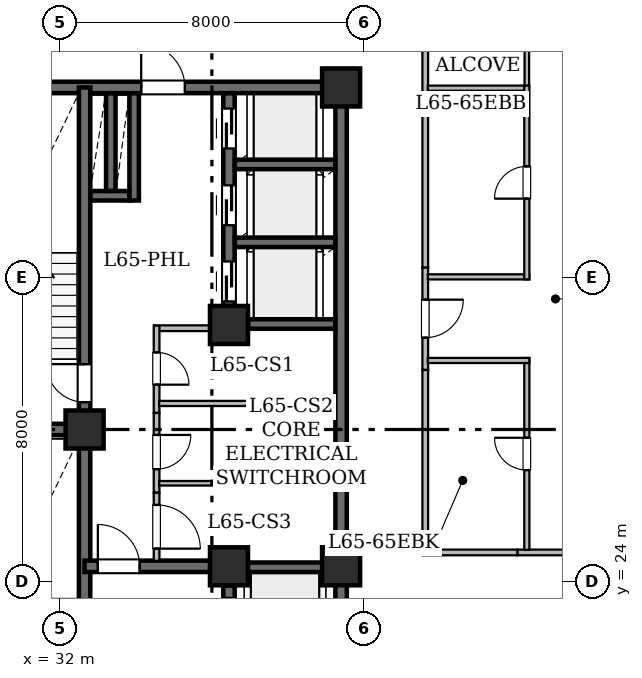
"""IFC4 building model, lengths in metres.
Left out: names, types, materials, properties, quantities, classifications, styles, units other than length and angle.
Written with IfcOpenShell. Run it as: python <this file> out.ifc"""

import sys

from ifc_helpers import new_model, si_unit, direction, frame, frame_2d, origin, origin_2d, place, context, subcontext, project, spatial, rectangle, hollow_rectangle, extrude, element, fill, save


model = new_model("IFC4")
c1 = context("Model", 3, precision=1e-05, world=origin(), true_north=direction((0.0, 1.0)))
c2 = subcontext(c1, "Body", "Model", "MODEL_VIEW")
j1 = project(units=[si_unit("LENGTHUNIT", "METRE"), si_unit("PLANEANGLEUNIT", "RADIAN")], contexts=[c1])
p1 = place(None, origin())
s1 = spatial("IfcSite", under=j1, at=p1, CompositionType="ELEMENT")
p2 = place(p1, origin())
s2 = spatial("IfcBuilding", under=s1, at=p2, CompositionType="ELEMENT")
p3 = place(p2, frame((0.0, 0.0, 253.7)))
s3 = spatial("IfcBuildingStorey", under=s2, at=p3, CompositionType="ELEMENT", Elevation=253.7)
for number, where, z_axis, x_axis in (
    (1, (32.65, 28.0, 0.0), (0.0, 0.0, 1.0), (1.0, 0.0, 0.0)),
    (2, (36.45, 24.4, 0.0), (0.0, 0.0, 1.0), (1.0, 0.0, 0.0)),
    (3, (39.4, 24.4, 0.0), (0.0, 0.0, 1.0), (1.0, 0.0, 0.0)),
    (4, (36.45, 30.75, 0.0), (0.0, 0.0, 1.0), (1.0, 0.0, 0.0)),
    (5, (39.4, 37.0, 0.0), (0.0, 0.0, 1.0), (1.0, 0.0, 0.0)),
):
    element("IfcColumn", number, at=place(p3, frame(where, z_axis=z_axis, x_axis=x_axis)), inside=s3, PredefinedType="COLUMN", context=c2, shape_type="SweptSolid", body=[
        extrude(hollow_rectangle(XDim=1.0, YDim=1.0, WallThickness=0.05, at=origin_2d()), origin(), (0.0, 0.0, 1.0), 3.65),
    ])
p4 = place(p3, frame((29.0, 37.0, 0.0), z_axis=(0.0, 0.0, 1.0), x_axis=(1.0, 0.0, 0.0)))
e6 = element("IfcWall", 6, at=p4, inside=s3, PredefinedType="SHEAR", context=c2, shape_type="SweptSolid", body=[
    extrude(rectangle(XDim=10.4, YDim=0.3, at=frame_2d((5.2, 0.0))), origin(), (0.0, 0.0, 1.0), 3.43),
])
p5 = place(p4, frame((5.14, 0.0, 0.0)))
e7 = element("IfcOpeningElement", 7, at=p5, cuts=e6, PredefinedType="OPENING", context=c2, shape_type="SweptSolid", body=[
    extrude(rectangle(XDim=1.15, YDim=2.2, at=frame_2d((0.575, 1.1))), frame((0.0, 0.16, 0.0), z_axis=(0.0, -1.0, 0.0), x_axis=(1.0, 0.0, 0.0)), (0.0, 0.0, 1.0), 0.32),
])
p6 = place(p3, frame((39.4, 19.0, 0.0), z_axis=(0.0, 0.0, 1.0), x_axis=(0.0, 1.0, 0.0)))
e8 = element("IfcWall", 8, at=p6, inside=s3, PredefinedType="SHEAR", context=c2, shape_type="SweptSolid", body=[
    extrude(rectangle(XDim=5.4, YDim=0.3, at=frame_2d((2.7, 0.0))), origin(), (0.0, 0.0, 1.0), 3.43),
])
p7 = place(p3, frame((39.4, 24.4, 0.0), z_axis=(0.0, 0.0, 1.0), x_axis=(0.0, 1.0, 0.0)))
e9 = element("IfcWall", 9, at=p7, inside=s3, PredefinedType="SHEAR", context=c2, shape_type="SweptSolid", body=[
    extrude(rectangle(XDim=12.6, YDim=0.3, at=frame_2d((6.3, 0.0))), origin(), (0.0, 0.0, 1.0), 3.43),
])
p8 = place(p3, frame((32.65, 19.0, 0.0), z_axis=(0.0, 0.0, 1.0), x_axis=(0.0, 1.0, 0.0)))
e10 = element("IfcWall", 10, at=p8, inside=s3, PredefinedType="SHEAR", context=c2, shape_type="SweptSolid", body=[
    extrude(rectangle(XDim=9.0, YDim=0.3, at=frame_2d((4.5, 0.0))), origin(), (0.0, 0.0, 1.0), 3.43),
])
p9 = place(p8, frame((0.72, 0.0, 0.0)))
e11 = element("IfcOpeningElement", 11, at=p9, cuts=e10, PredefinedType="OPENING", context=c2, shape_type="SweptSolid", body=[
    extrude(rectangle(XDim=1.0, YDim=2.15, at=frame_2d((0.5, 1.075))), frame((0.0, 0.16, 0.0), z_axis=(0.0, -1.0, 0.0), x_axis=(1.0, 0.0, 0.0)), (0.0, 0.0, 1.0), 0.32),
])
p10 = place(p3, frame((32.65, 28.0, 0.0), z_axis=(0.0, 0.0, 1.0), x_axis=(0.0, 1.0, 0.0)))
e12 = element("IfcWall", 12, at=p10, inside=s3, PredefinedType="SHEAR", context=c2, shape_type="SweptSolid", body=[
    extrude(rectangle(XDim=9.0, YDim=0.3, at=frame_2d((4.5, 0.0))), origin(), (0.0, 0.0, 1.0), 3.43),
])
p11 = place(p10, frame((0.72, 0.0, 0.0)))
e13 = element("IfcOpeningElement", 13, at=p11, cuts=e12, PredefinedType="OPENING", context=c2, shape_type="SweptSolid", body=[
    extrude(rectangle(XDim=1.0, YDim=2.15, at=frame_2d((0.5, 1.075))), frame((0.0, 0.16, 0.0), z_axis=(0.0, -1.0, 0.0), x_axis=(1.0, 0.0, 0.0)), (0.0, 0.0, 1.0), 0.32),
])
p12 = place(p3, frame((29.0, 28.0, 0.0), z_axis=(0.0, 0.0, 1.0), x_axis=(1.0, 0.0, 0.0)))
e14 = element("IfcWall", 14, at=p12, inside=s3, PredefinedType="SHEAR", context=c2, shape_type="SweptSolid", body=[
    extrude(rectangle(XDim=3.65, YDim=0.3, at=frame_2d((1.825, 0.0))), origin(), (0.0, 0.0, 1.0), 3.43),
])
p13 = place(p3, frame((32.65, 24.4, 0.0), z_axis=(0.0, 0.0, 1.0), x_axis=(1.0, 0.0, 0.0)))
e15 = element("IfcWall", 15, at=p13, inside=s3, PredefinedType="SHEAR", context=c2, shape_type="SweptSolid", body=[
    extrude(rectangle(XDim=3.8, YDim=0.3, at=frame_2d((1.9, 0.0))), origin(), (0.0, 0.0, 1.0), 3.43),
])
p14 = place(p13, frame((0.35, 0.0, 0.0)))
e16 = element("IfcOpeningElement", 16, at=p14, cuts=e15, PredefinedType="OPENING", context=c2, shape_type="SweptSolid", body=[
    extrude(rectangle(XDim=1.1, YDim=2.15, at=frame_2d((0.55, 1.075))), frame((0.0, 0.16, 0.0), z_axis=(0.0, -1.0, 0.0), x_axis=(1.0, 0.0, 0.0)), (0.0, 0.0, 1.0), 0.32),
])
p15 = place(p3, frame((36.45, 19.154, 0.0), z_axis=(0.0, 0.0, 1.0), x_axis=(0.0, 1.0, 0.0)))
e17 = element("IfcWall", 17, at=p15, inside=s3, PredefinedType="SHEAR", context=c2, shape_type="SweptSolid", body=[
    extrude(rectangle(XDim=4.746, YDim=0.3, at=frame_2d((2.373, 0.0))), origin(), (0.0, 0.0, 1.0), 3.43),
])
p16 = place(p15, frame((0.696, 0.0, 0.0)))
e18 = element("IfcOpeningElement", 18, at=p16, cuts=e17, PredefinedType="OPENING", context=c2, shape_type="SweptSolid", body=[
    extrude(rectangle(XDim=1.1, YDim=2.15, at=frame_2d((0.55, 1.075))), frame((0.0, 0.16, 0.0), z_axis=(0.0, -1.0, 0.0), x_axis=(1.0, 0.0, 0.0)), (0.0, 0.0, 1.0), 0.32),
])
p17 = place(p15, frame((3.316, 0.0, 0.0)))
e19 = element("IfcOpeningElement", 19, at=p17, cuts=e17, PredefinedType="OPENING", context=c2, shape_type="SweptSolid", body=[
    extrude(rectangle(XDim=1.1, YDim=2.15, at=frame_2d((0.55, 1.075))), frame((0.0, 0.16, 0.0), z_axis=(0.0, -1.0, 0.0), x_axis=(1.0, 0.0, 0.0)), (0.0, 0.0, 1.0), 0.32),
])
p18 = place(p3, frame((36.45, 31.25, 0.0), z_axis=(0.0, 0.0, 1.0), x_axis=(0.0, 1.0, 0.0)))
e20 = element("IfcWall", 20, at=p18, inside=s3, PredefinedType="SHEAR", context=c2, shape_type="SweptSolid", body=[
    extrude(rectangle(XDim=5.596, YDim=0.3, at=frame_2d((2.798, 0.0))), origin(), (0.0, 0.0, 1.0), 3.43),
])
p19 = place(p18, frame((0.12, 0.0, 0.0)))
e21 = element("IfcOpeningElement", 21, at=p19, cuts=e20, PredefinedType="OPENING", context=c2, shape_type="SweptSolid", body=[
    extrude(rectangle(XDim=1.05, YDim=2.15, at=frame_2d((0.525, 1.075))), frame((0.0, 0.16, 0.0), z_axis=(0.0, -1.0, 0.0), x_axis=(1.0, 0.0, 0.0)), (0.0, 0.0, 1.0), 0.32),
])
p20 = place(p18, frame((2.125, 0.0, 0.0)))
e22 = element("IfcOpeningElement", 22, at=p20, cuts=e20, PredefinedType="OPENING", context=c2, shape_type="SweptSolid", body=[
    extrude(rectangle(XDim=1.05, YDim=2.15, at=frame_2d((0.525, 1.075))), frame((0.0, 0.16, 0.0), z_axis=(0.0, -1.0, 0.0), x_axis=(1.0, 0.0, 0.0)), (0.0, 0.0, 1.0), 0.32),
])
p21 = place(p18, frame((4.145, 0.0, 0.0)))
e23 = element("IfcOpeningElement", 23, at=p21, cuts=e20, PredefinedType="OPENING", context=c2, shape_type="SweptSolid", body=[
    extrude(rectangle(XDim=1.05, YDim=2.15, at=frame_2d((0.525, 1.075))), frame((0.0, 0.16, 0.0), z_axis=(0.0, -1.0, 0.0), x_axis=(1.0, 0.0, 0.0)), (0.0, 0.0, 1.0), 0.32),
])
p22 = place(p3, frame((36.604, 24.375, 0.0), z_axis=(0.0, 0.0, 1.0), x_axis=(1.0, 0.0, 0.0)))
e24 = element("IfcWall", 24, at=p22, inside=s3, PredefinedType="SHEAR", context=c2, shape_type="SweptSolid", body=[
    extrude(rectangle(XDim=2.642, YDim=0.25, at=frame_2d((1.321, 0.0))), origin(), (0.0, 0.0, 1.0), 3.43),
])
p23 = place(p3, frame((36.954, 30.775, 0.0), z_axis=(0.0, 0.0, 1.0), x_axis=(1.0, 0.0, 0.0)))
e25 = element("IfcWall", 25, at=p23, inside=s3, PredefinedType="SHEAR", context=c2, shape_type="SweptSolid", body=[
    extrude(rectangle(XDim=2.292, YDim=0.25, at=frame_2d((1.146, 0.0))), origin(), (0.0, 0.0, 1.0), 3.43),
])
for number, where, z_axis, x_axis in (
    (26, (36.604, 32.925, 0.0), (0.0, 0.0, 1.0), (1.0, 0.0, 0.0)),
    (27, (36.604, 34.975, 0.0), (0.0, 0.0, 1.0), (1.0, 0.0, 0.0)),
):
    element("IfcWall", number, at=place(p3, frame(where, z_axis=z_axis, x_axis=x_axis)), inside=s3, PredefinedType="SHEAR", context=c2, shape_type="SweptSolid", body=[
        extrude(rectangle(XDim=2.642, YDim=0.25, at=frame_2d((1.321, 0.0))), origin(), (0.0, 0.0, 1.0), 3.43),
    ])
p24 = place(p3, frame((33.955, 34.025, 0.0), z_axis=(0.0, 0.0, 1.0), x_axis=(0.0, 1.0, 0.0)))
e28 = element("IfcWall", 28, at=p24, inside=s3, PredefinedType="SHEAR", context=c2, shape_type="SweptSolid", body=[
    extrude(rectangle(XDim=2.821, YDim=0.25, at=frame_2d((1.411, 0.0))), origin(), (0.0, 0.0, 1.0), 3.43),
])
p25 = place(p3, frame((32.804, 34.15, 0.0), z_axis=(0.0, 0.0, 1.0), x_axis=(1.0, 0.0, 0.0)))
e29 = element("IfcWall", 29, at=p25, inside=s3, PredefinedType="SHEAR", context=c2, shape_type="SweptSolid", body=[
    extrude(rectangle(XDim=1.022, YDim=0.25, at=frame_2d((0.511, 0.0))), origin(), (0.0, 0.0, 1.0), 3.43),
])
p26 = place(p3, frame((33.34, 34.279, 0.0), z_axis=(0.0, 0.0, 1.0), x_axis=(0.0, 1.0, 0.0)))
e30 = element("IfcWall", 30, at=p26, inside=s3, PredefinedType="SHEAR", context=c2, shape_type="SweptSolid", body=[
    extrude(rectangle(XDim=2.567, YDim=0.25, at=frame_2d((1.283, 0.0))), origin(), (0.0, 0.0, 1.0), 3.43),
])
p27 = place(p3, frame((36.3, 30.665, 0.0), z_axis=(0.0, 0.0, 1.0), x_axis=(-1.0, 0.0, 0.0)))
e31 = element("IfcWall", 31, at=p27, inside=s3, PredefinedType="STANDARD", context=c2, shape_type="SweptSolid", body=[
    extrude(rectangle(XDim=1.82, YDim=0.15, at=frame_2d((0.91, 0.0))), origin(), (0.0, 0.0, 1.0), 3.43),
])
p28 = place(p3, frame((34.545, 30.73, 0.0), z_axis=(0.0, 0.0, 1.0), x_axis=(0.0, -1.0, 0.0)))
e32 = element("IfcWall", 32, at=p28, inside=s3, PredefinedType="STANDARD", context=c2, shape_type="SweptSolid", body=[
    extrude(rectangle(XDim=2.294, YDim=0.15, at=frame_2d((1.147, 0.0))), origin(), (0.0, 0.0, 1.0), 3.43),
])
p29 = place(p28, frame((0.701, 0.0, 0.0)))
e33 = element("IfcOpeningElement", 33, at=p29, cuts=e32, PredefinedType="OPENING", context=c2, shape_type="SweptSolid", body=[
    extrude(rectangle(XDim=0.85, YDim=2.1, at=frame_2d((0.425, 1.05))), frame((0.0, 0.085, 0.0), z_axis=(0.0, -1.0, 0.0), x_axis=(1.0, 0.0, 0.0)), (0.0, 0.0, 1.0), 0.17),
])
p30 = place(p3, frame((34.545, 28.436, 0.0), z_axis=(0.0, 0.0, 1.0), x_axis=(0.0, -1.0, 0.0)))
e34 = element("IfcWall", 34, at=p30, inside=s3, PredefinedType="STANDARD", context=c2, shape_type="SweptSolid", body=[
    extrude(rectangle(XDim=2.1, YDim=0.15, at=frame_2d((1.05, 0.0))), origin(), (0.0, 0.0, 1.0), 3.43),
])
p31 = place(p30, frame((0.579, 0.0, 0.0)))
e35 = element("IfcOpeningElement", 35, at=p31, cuts=e34, PredefinedType="OPENING", context=c2, shape_type="SweptSolid", body=[
    extrude(rectangle(XDim=0.9, YDim=2.1, at=frame_2d((0.45, 1.05))), frame((0.0, 0.085, 0.0), z_axis=(0.0, -1.0, 0.0), x_axis=(1.0, 0.0, 0.0)), (0.0, 0.0, 1.0), 0.17),
])
p32 = place(p3, frame((34.545, 26.336, 0.0), z_axis=(0.0, 0.0, 1.0), x_axis=(0.0, -1.0, 0.0)))
e36 = element("IfcWall", 36, at=p32, inside=s3, PredefinedType="STANDARD", context=c2, shape_type="SweptSolid", body=[
    extrude(rectangle(XDim=1.792, YDim=0.15, at=frame_2d((0.896, 0.0))), origin(), (0.0, 0.0, 1.0), 3.43),
])
p33 = place(p32, frame((0.321, 0.0, 0.0)))
e37 = element("IfcOpeningElement", 37, at=p33, cuts=e36, PredefinedType="OPENING", context=c2, shape_type="SweptSolid", body=[
    extrude(rectangle(XDim=1.15, YDim=2.2, at=frame_2d((0.575, 1.1))), frame((0.0, 0.085, 0.0), z_axis=(0.0, -1.0, 0.0), x_axis=(1.0, 0.0, 0.0)), (0.0, 0.0, 1.0), 0.17),
])
p34 = place(p3, frame((39.256, 28.685, 0.0), z_axis=(0.0, 0.0, 1.0), x_axis=(-1.0, 0.0, 0.0)))
e38 = element("IfcWall", 38, at=p34, inside=s3, PredefinedType="PARTITIONING", context=c2, shape_type="SweptSolid", body=[
    extrude(rectangle(XDim=4.644, YDim=0.135, at=frame_2d((2.322, 0.0))), origin(), (0.0, 0.0, 1.0), 3.43),
])
p35 = place(p3, frame((39.256, 26.585, 0.0), z_axis=(0.0, 0.0, 1.0), x_axis=(-1.0, 0.0, 0.0)))
e39 = element("IfcWall", 39, at=p35, inside=s3, PredefinedType="PARTITIONING", context=c2, shape_type="SweptSolid", body=[
    extrude(rectangle(XDim=4.644, YDim=0.12, at=frame_2d((2.322, 0.0))), origin(), (0.0, 0.0, 1.0), 3.43),
])
p36 = place(p3, frame((41.615, 39.1, 0.0), z_axis=(0.0, 0.0, 1.0), x_axis=(0.0, -1.0, 0.0)))
e40 = element("IfcWall", 40, at=p36, inside=s3, PredefinedType="STANDARD", context=c2, shape_type="SweptSolid", body=[
    extrude(rectangle(XDim=2.368, YDim=0.15, at=frame_2d((1.184, 0.0))), origin(), (0.0, 0.0, 1.0), 2.725),
])
p37 = place(p3, frame((41.615, 32.265, 0.0), z_axis=(0.0, 0.0, 1.0), x_axis=(0.0, -1.0, 0.0)))
e41 = element("IfcWall", 41, at=p37, inside=s3, PredefinedType="STANDARD", context=c2, shape_type="SweptSolid", body=[
    extrude(rectangle(XDim=2.698, YDim=0.15, at=frame_2d((1.349, 0.0))), origin(), (0.0, 0.0, 1.0), 3.43),
])
p38 = place(p37, frame((0.849, 0.0, 0.0)))
e42 = element("IfcOpeningElement", 42, at=p38, cuts=e41, PredefinedType="OPENING", context=c2, shape_type="SweptSolid", body=[
    extrude(rectangle(XDim=1.0, YDim=2.15, at=frame_2d((0.5, 1.075))), frame((0.0, 0.085, 0.0), z_axis=(0.0, -1.0, 0.0), x_axis=(1.0, 0.0, 0.0)), (0.0, 0.0, 1.0), 0.17),
])
p39 = place(p3, frame((44.039, 24.765, 0.0), z_axis=(0.0, 0.0, 1.0), x_axis=(1.0, 0.0, 0.0)))
e43 = element("IfcWall", 43, at=p39, inside=s3, PredefinedType="STANDARD", context=c2, shape_type="SweptSolid", body=[
    extrude(rectangle(XDim=2.078, YDim=0.15, at=frame_2d((1.039, 0.0))), origin(), (0.0, 0.0, 1.0), 3.43),
])
p40 = place(p3, frame((41.615, 36.732, 0.0), z_axis=(0.0, 0.0, 1.0), x_axis=(0.0, -1.0, 0.0)))
e44 = element("IfcWall", 44, at=p40, inside=s3, PredefinedType="STANDARD", context=c2, shape_type="SweptSolid", body=[
    extrude(rectangle(XDim=4.467, YDim=0.15, at=frame_2d((2.233, 0.0))), origin(), (0.0, 0.0, 1.0), 3.013),
])
p41 = place(p3, frame((41.615, 29.567, 0.0), z_axis=(0.0, 0.0, 1.0), x_axis=(0.0, -1.0, 0.0)))
e45 = element("IfcWall", 45, at=p41, inside=s3, PredefinedType="STANDARD", context=c2, shape_type="SweptSolid", body=[
    extrude(rectangle(XDim=4.867, YDim=0.15, at=frame_2d((2.434, 0.0))), origin(), (0.0, 0.0, 1.0), 3.43),
])
p42 = place(p3, frame((41.55, 24.765, 0.0), z_axis=(0.0, 0.0, 1.0), x_axis=(1.0, 0.0, 0.0)))
e46 = element("IfcWall", 46, at=p42, inside=s3, PredefinedType="STANDARD", context=c2, shape_type="SweptSolid", body=[
    extrude(rectangle(XDim=2.489, YDim=0.15, at=frame_2d((1.245, 0.0))), origin(), (0.0, 0.0, 1.0), 3.43),
])
p43 = place(p3, frame((44.288, 43.808, 0.0), z_axis=(0.0, 0.0, 1.0), x_axis=(0.0, -1.0, 0.0)))
e47 = element("IfcWall", 47, at=p43, inside=s3, PredefinedType="PARTITIONING", context=c2, shape_type="SweptSolid", body=[
    extrude(rectangle(XDim=6.762, YDim=0.12, at=frame_2d((3.381, 0.0))), origin(), (0.0, 0.0, 1.0), 2.725),
])
p44 = place(p43, frame((2.931, 0.0, 0.0)))
e48 = element("IfcOpeningElement", 48, at=p44, cuts=e47, PredefinedType="OPENING", context=c2, shape_type="SweptSolid", body=[
    extrude(rectangle(XDim=0.9, YDim=2.1, at=frame_2d((0.45, 1.05))), frame((0.0, 0.07, 0.0), z_axis=(0.0, -1.0, 0.0), x_axis=(1.0, 0.0, 0.0)), (0.0, 0.0, 1.0), 0.14),
])
p45 = place(p3, frame((44.223, 36.981, 0.0), z_axis=(0.0, 0.0, 1.0), x_axis=(-1.0, 0.0, 0.0)))
e49 = element("IfcWall", 49, at=p45, inside=s3, PredefinedType="PARTITIONING", context=c2, shape_type="SweptSolid", body=[
    extrude(rectangle(XDim=2.541, YDim=0.135, at=frame_2d((1.271, 0.0))), origin(), (0.0, 0.0, 1.0), 2.725),
])
p46 = place(p3, frame((41.682, 32.016, 0.0), z_axis=(0.0, 0.0, 1.0), x_axis=(1.0, 0.0, 0.0)))
e50 = element("IfcWall", 50, at=p46, inside=s3, PredefinedType="PARTITIONING", context=c2, shape_type="SweptSolid", body=[
    extrude(rectangle(XDim=2.671, YDim=0.135, at=frame_2d((1.335, 0.0))), origin(), (0.0, 0.0, 1.0), 3.43),
])
p47 = place(p3, frame((44.288, 31.951, 0.0), z_axis=(0.0, 0.0, 1.0), x_axis=(0.0, 1.0, 0.0)))
e51 = element("IfcWall", 51, at=p47, inside=s3, PredefinedType="PARTITIONING", context=c2, shape_type="SweptSolid", body=[
    extrude(rectangle(XDim=5.095, YDim=0.135, at=frame_2d((2.547, 0.0))), origin(), (0.0, 0.0, 1.0), 3.013),
])
p48 = place(p47, frame((2.123, 0.0, 0.0)))
e52 = element("IfcOpeningElement", 52, at=p48, cuts=e51, PredefinedType="OPENING", context=c2, shape_type="SweptSolid", body=[
    extrude(rectangle(XDim=0.85, YDim=2.1, at=frame_2d((0.425, 1.05))), frame((0.0, 0.077, 0.0), z_axis=(0.0, -1.0, 0.0), x_axis=(1.0, 0.0, 0.0)), (0.0, 0.0, 1.0), 0.155),
])
p49 = place(p3, frame((44.288, 24.832, 0.0), z_axis=(0.0, 0.0, 1.0), x_axis=(0.0, 1.0, 0.0)))
e53 = element("IfcWall", 53, at=p49, inside=s3, PredefinedType="PARTITIONING", context=c2, shape_type="SweptSolid", body=[
    extrude(rectangle(XDim=5.049, YDim=0.135, at=frame_2d((2.524, 0.0))), origin(), (0.0, 0.0, 1.0), 3.43),
])
p50 = place(p49, frame((2.1, 0.0, 0.0)))
e54 = element("IfcOpeningElement", 54, at=p50, cuts=e53, PredefinedType="OPENING", context=c2, shape_type="SweptSolid", body=[
    extrude(rectangle(XDim=0.85, YDim=2.1, at=frame_2d((0.425, 1.05))), frame((0.0, 0.077, 0.0), z_axis=(0.0, -1.0, 0.0), x_axis=(1.0, 0.0, 0.0)), (0.0, 0.0, 1.0), 0.155),
])
p51 = place(p3, frame((44.353, 29.816, 0.0), z_axis=(0.0, 0.0, 1.0), x_axis=(-1.0, 0.0, 0.0)))
e55 = element("IfcWall", 55, at=p51, inside=s3, PredefinedType="PARTITIONING", context=c2, shape_type="SweptSolid", body=[
    extrude(rectangle(XDim=2.671, YDim=0.135, at=frame_2d((1.335, 0.0))), origin(), (0.0, 0.0, 1.0), 3.43),
])
p52 = place(p11, origin())
e56 = element("IfcDoor", 56, at=p52, inside=s3, OperationType="SINGLE_SWING_RIGHT", PredefinedType="DOOR", context=c2, shape_type="SweptSolid", body=[
    extrude(rectangle(XDim=1.0, YDim=2.15, at=frame_2d((0.5, 1.075))), frame((0.0, 0.025, 0.0), z_axis=(0.0, -1.0, 0.0), x_axis=(1.0, 0.0, 0.0)), (0.0, 0.0, 1.0), 0.05),
])
fill(e13, e56)
p53 = place(p14, origin())
e57 = element("IfcDoor", 57, at=p53, inside=s3, OperationType="SINGLE_SWING_LEFT", PredefinedType="DOOR", context=c2, shape_type="SweptSolid", body=[
    extrude(rectangle(XDim=1.1, YDim=2.15, at=frame_2d((0.55, 1.075))), frame((0.0, 0.025, 0.0), z_axis=(0.0, -1.0, 0.0), x_axis=(1.0, 0.0, 0.0)), (0.0, 0.0, 1.0), 0.05),
])
fill(e16, e57)
p54 = place(p5, origin())
e58 = element("IfcDoor", 58, at=p54, inside=s3, OperationType="SINGLE_SWING_LEFT", PredefinedType="DOOR", context=c2, shape_type="SweptSolid", body=[
    extrude(rectangle(XDim=1.15, YDim=2.2, at=frame_2d((0.575, 1.1))), frame((0.0, 0.025, 0.0), z_axis=(0.0, -1.0, 0.0), x_axis=(1.0, 0.0, 0.0)), (0.0, 0.0, 1.0), 0.05),
])
fill(e7, e58)
p55 = place(p17, origin())
e59 = element("IfcDoor", 59, at=p55, inside=s3, OperationType="SLIDING_TO_LEFT", PredefinedType="DOOR", context=c2, shape_type="SweptSolid", body=[
    extrude(rectangle(XDim=1.1, YDim=2.15, at=frame_2d((0.55, 1.075))), frame((0.0, 0.025, 0.0), z_axis=(0.0, -1.0, 0.0), x_axis=(1.0, 0.0, 0.0)), (0.0, 0.0, 1.0), 0.05),
])
fill(e19, e59)
p56 = place(p19, origin())
e60 = element("IfcDoor", 60, at=p56, inside=s3, OperationType="SLIDING_TO_LEFT", PredefinedType="DOOR", context=c2, shape_type="SweptSolid", body=[
    extrude(rectangle(XDim=1.05, YDim=2.15, at=frame_2d((0.525, 1.075))), frame((0.0, 0.025, 0.0), z_axis=(0.0, -1.0, 0.0), x_axis=(1.0, 0.0, 0.0)), (0.0, 0.0, 1.0), 0.05),
])
fill(e21, e60)
p57 = place(p20, origin())
e61 = element("IfcDoor", 61, at=p57, inside=s3, OperationType="SLIDING_TO_LEFT", PredefinedType="DOOR", context=c2, shape_type="SweptSolid", body=[
    extrude(rectangle(XDim=1.05, YDim=2.15, at=frame_2d((0.525, 1.075))), frame((0.0, 0.025, 0.0), z_axis=(0.0, -1.0, 0.0), x_axis=(1.0, 0.0, 0.0)), (0.0, 0.0, 1.0), 0.05),
])
fill(e22, e61)
p58 = place(p21, origin())
e62 = element("IfcDoor", 62, at=p58, inside=s3, OperationType="SLIDING_TO_LEFT", PredefinedType="DOOR", context=c2, shape_type="SweptSolid", body=[
    extrude(rectangle(XDim=1.05, YDim=2.15, at=frame_2d((0.525, 1.075))), frame((0.0, 0.025, 0.0), z_axis=(0.0, -1.0, 0.0), x_axis=(1.0, 0.0, 0.0)), (0.0, 0.0, 1.0), 0.05),
])
fill(e23, e62)
p59 = place(p29, origin())
e63 = element("IfcDoor", 63, at=p59, inside=s3, OperationType="SINGLE_SWING_RIGHT", PredefinedType="DOOR", context=c2, shape_type="SweptSolid", body=[
    extrude(rectangle(XDim=0.85, YDim=2.1, at=frame_2d((0.425, 1.05))), frame((0.0, 0.025, 0.0), z_axis=(0.0, -1.0, 0.0), x_axis=(1.0, 0.0, 0.0)), (0.0, 0.0, 1.0), 0.05),
])
fill(e33, e63)
p60 = place(p31, origin())
e64 = element("IfcDoor", 64, at=p60, inside=s3, OperationType="SINGLE_SWING_LEFT", PredefinedType="DOOR", context=c2, shape_type="SweptSolid", body=[
    extrude(rectangle(XDim=0.9, YDim=2.1, at=frame_2d((0.45, 1.05))), frame((0.0, 0.025, 0.0), z_axis=(0.0, -1.0, 0.0), x_axis=(1.0, 0.0, 0.0)), (0.0, 0.0, 1.0), 0.05),
])
fill(e35, e64)
p61 = place(p33, origin())
e65 = element("IfcDoor", 65, at=p61, inside=s3, OperationType="SINGLE_SWING_RIGHT", PredefinedType="DOOR", context=c2, shape_type="SweptSolid", body=[
    extrude(rectangle(XDim=1.15, YDim=2.2, at=frame_2d((0.575, 1.1))), frame((0.0, 0.025, 0.0), z_axis=(0.0, -1.0, 0.0), x_axis=(1.0, 0.0, 0.0)), (0.0, 0.0, 1.0), 0.05),
])
fill(e37, e65)
p62 = place(p38, origin())
e66 = element("IfcDoor", 66, at=p62, inside=s3, OperationType="SINGLE_SWING_LEFT", PredefinedType="DOOR", context=c2, shape_type="SweptSolid", body=[
    extrude(rectangle(XDim=1.0, YDim=2.15, at=frame_2d((0.5, 1.075))), frame((0.0, 0.025, 0.0), z_axis=(0.0, -1.0, 0.0), x_axis=(1.0, 0.0, 0.0)), (0.0, 0.0, 1.0), 0.05),
])
fill(e42, e66)
p63 = place(p48, origin())
e67 = element("IfcDoor", 67, at=p63, inside=s3, OperationType="SINGLE_SWING_LEFT", PredefinedType="DOOR", context=c2, shape_type="SweptSolid", body=[
    extrude(rectangle(XDim=0.85, YDim=2.1, at=frame_2d((0.425, 1.05))), frame((0.0, 0.025, 0.0), z_axis=(0.0, -1.0, 0.0), x_axis=(1.0, 0.0, 0.0)), (0.0, 0.0, 1.0), 0.05),
])
fill(e52, e67)
p64 = place(p50, origin())
e68 = element("IfcDoor", 68, at=p64, inside=s3, OperationType="SINGLE_SWING_RIGHT", PredefinedType="DOOR", context=c2, shape_type="SweptSolid", body=[
    extrude(rectangle(XDim=0.85, YDim=2.1, at=frame_2d((0.425, 1.05))), frame((0.0, 0.025, 0.0), z_axis=(0.0, -1.0, 0.0), x_axis=(1.0, 0.0, 0.0)), (0.0, 0.0, 1.0), 0.05),
])
fill(e54, e68)
save(model, sys.argv[1])
